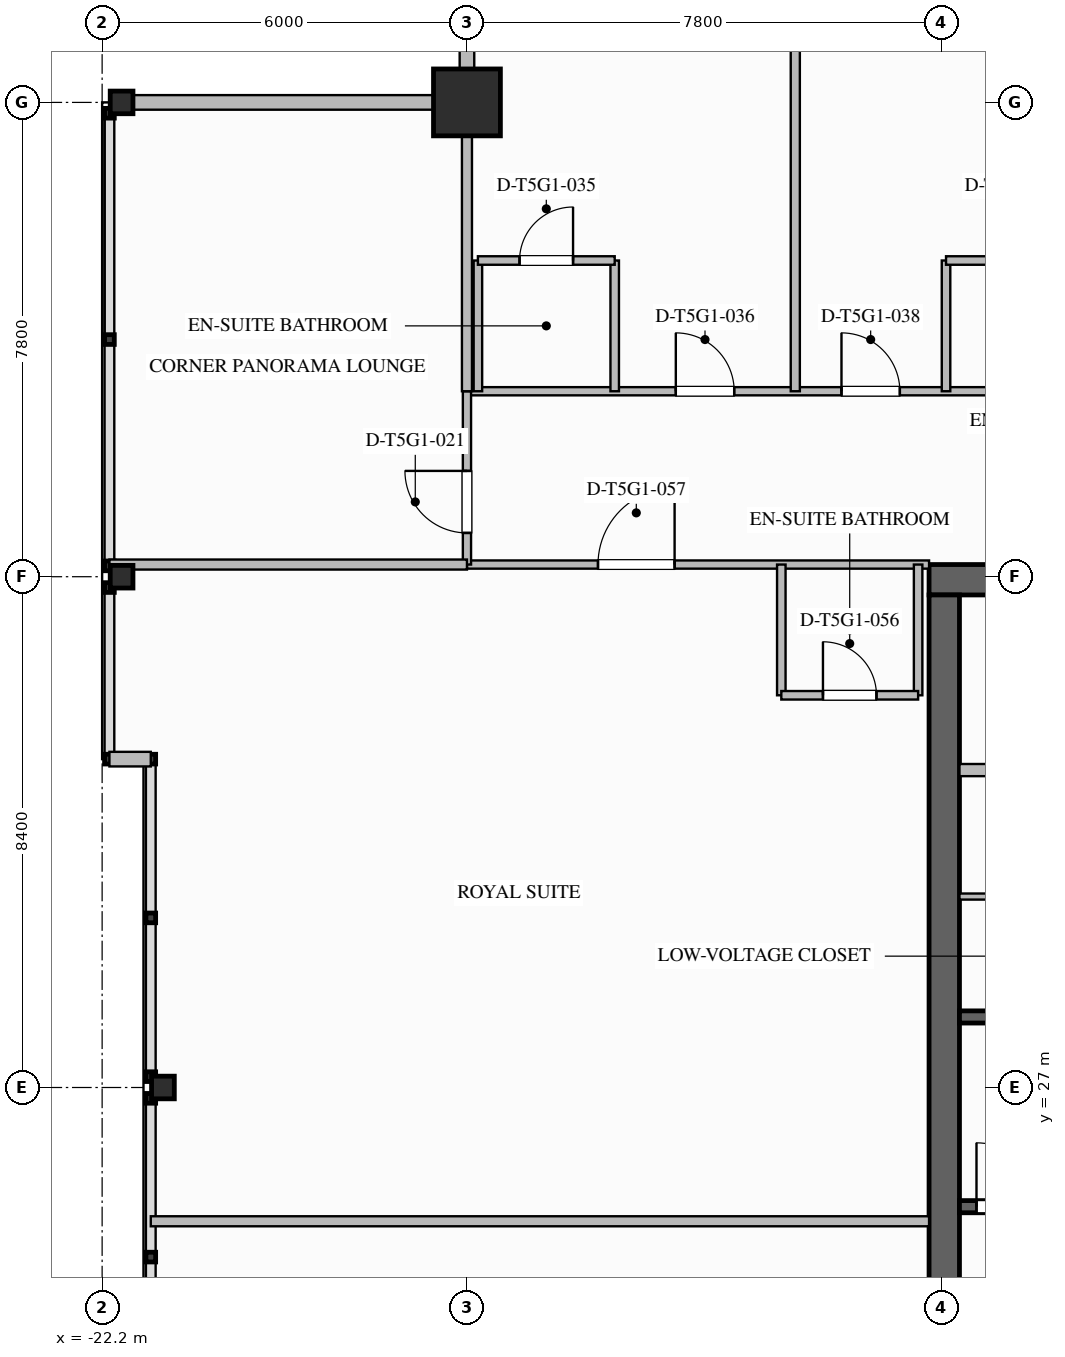
"""IFC4 building model, lengths in metres.
Left out: names, types, materials, properties, quantities, classifications, styles, units other than length and angle.
Written with IfcOpenShell. Run it as: python <this file> out.ifc"""

import sys

from ifc_helpers import new_model, si_unit, direction, frame, frame_2d, origin, origin_2d, place, context, subcontext, project, spatial, rectangle, i_section, extrude, element, fill, save


model = new_model("IFC4")
c1 = context("Model", 3, precision=1e-05, world=origin(), true_north=direction((0.0, 1.0)))
c2 = subcontext(c1, "Body", "Model", "MODEL_VIEW")
j1 = project(units=[si_unit("LENGTHUNIT", "METRE"), si_unit("PLANEANGLEUNIT", "RADIAN")], contexts=[c1])
p1 = place(None, origin())
s1 = spatial("IfcSite", under=j1, at=p1, CompositionType="ELEMENT")
p2 = place(p1, origin())
s2 = spatial("IfcBuilding", under=s1, at=p2, CompositionType="ELEMENT")
p3 = place(p2, frame((0.0, 0.0, 268.65)))
s3 = spatial("IfcBuildingStorey", under=s2, at=p3, CompositionType="ELEMENT", Elevation=268.65)
p4 = place(p3, frame((-8.6, 35.35, 0.0), z_axis=(0.0, 0.0, 1.0), x_axis=(1.0, 0.0, 0.0)))
e1 = element("IfcWall", 1, at=p4, inside=s3, PredefinedType="SHEAR", context=c2, shape_type="SweptSolid", body=[
    extrude(rectangle(XDim=17.2, YDim=0.5, at=frame_2d((8.6, 0.0))), origin(), (0.0, 0.0, 1.0), 3.65),
])
p5 = place(p3, frame((-8.35, 18.9, 0.0), z_axis=(0.0, 0.0, 1.0), x_axis=(0.0, 1.0, 0.0)))
e2 = element("IfcWall", 2, at=p5, inside=s3, PredefinedType="SHEAR", context=c2, shape_type="SweptSolid", body=[
    extrude(rectangle(XDim=16.2, YDim=0.5, at=frame_2d((8.1, 0.0))), origin(), (0.0, 0.0, 1.0), 3.65),
])
p6 = place(p3, frame((-16.2, 43.2, 0.0), z_axis=(0.0, 0.0, 1.0), x_axis=(1.0, 0.0, 0.0)))
e3 = element("IfcColumn", 3, at=p6, inside=s3, PredefinedType="COLUMN", context=c2, shape_type="SweptSolid", body=[
    extrude(rectangle(XDim=1.1, YDim=1.1, at=origin_2d()), origin(), (0.0, 0.0, 1.0), 3.65),
])
for number, where, z_axis, x_axis in (
    (4, (-21.2, 27.0, 0.0), (0.0, 0.0, 1.0), (1.0, 0.0, 0.0)),
    (5, (-21.88, 35.4, 0.0), (0.0, 0.0, 1.0), (1.0, 0.0, 0.0)),
    (6, (-21.88, 43.2, 0.0), (0.0, 0.0, 1.0), (1.0, 0.0, 0.0)),
):
    element("IfcColumn", number, at=place(p3, frame(where, z_axis=z_axis, x_axis=x_axis)), inside=s3, PredefinedType="COLUMN", context=c2, shape_type="SweptSolid", body=[
        extrude(i_section(OverallWidth=0.374, OverallDepth=0.372, WebThickness=0.016, FlangeThickness=0.026, FilletRadius=0.025, at=origin_2d()), origin(), (0.0, 0.0, 1.0), 3.647),
    ])
for number, where, z_axis, x_axis in (
    (7, (-22.08, 43.2, 0.0), (0.0, 0.0, 1.0), (1.0, 0.0, 0.0)),
    (8, (-16.2, 43.2, 0.0), (0.0, 0.0, 1.0), (0.0, 1.0, 0.0)),
):
    element("IfcWall", number, at=place(p3, frame(where, z_axis=z_axis, x_axis=x_axis)), inside=s3, PredefinedType="STANDARD", context=c2, shape_type="SweptSolid", body=[
        extrude(rectangle(XDim=5.88, YDim=0.24, at=frame_2d((2.94, 0.0))), origin(), (0.0, 0.0, 1.0), 2.779),
    ])
p7 = place(p3, frame((-21.4, 32.4, 0.0), z_axis=(0.0, 0.0, 1.0), x_axis=(-1.0, 0.0, 0.0)))
e9 = element("IfcWall", 9, at=p7, inside=s3, PredefinedType="STANDARD", context=c2, shape_type="SweptSolid", body=[
    extrude(rectangle(XDim=0.68, YDim=0.24, at=frame_2d((0.34, 0.0))), origin(), (0.0, 0.0, 1.0), 3.39),
])
p8 = place(p3, frame((-8.1, 25.04, 0.0), z_axis=(0.0, 0.0, 1.0), x_axis=(1.0, 0.0, 0.0)))
e10 = element("IfcWall", 10, at=p8, inside=s3, PredefinedType="SOLIDWALL", context=c2, shape_type="SweptSolid", body=[
    extrude(rectangle(XDim=8.1, YDim=0.2, at=frame_2d((4.05, 0.0))), origin(), (0.0, 0.0, 1.0), 3.39),
])
p9 = place(p8, frame((0.28, 0.0, 0.0)))
e11 = element("IfcOpeningElement", 11, at=p9, cuts=e10, PredefinedType="OPENING", context=c2, shape_type="SweptSolid", body=[
    extrude(rectangle(XDim=1.05, YDim=2.1, at=frame_2d((0.525, 1.05))), frame((0.0, 0.11, 0.0), z_axis=(0.0, -1.0, 0.0), x_axis=(1.0, 0.0, 0.0)), (0.0, 0.0, 1.0), 0.22),
])
p10 = place(p3, frame((-8.1, 28.16, 0.0), z_axis=(0.0, 0.0, 1.0), x_axis=(1.0, 0.0, 0.0)))
e12 = element("IfcWall", 12, at=p10, inside=s3, PredefinedType="SOLIDWALL", context=c2, shape_type="SweptSolid", body=[
    extrude(rectangle(XDim=8.1, YDim=0.2, at=frame_2d((4.05, 0.0))), origin(), (0.0, 0.0, 1.0), 3.39),
])
p11 = place(p3, frame((-8.1, 32.22, 0.0), z_axis=(0.0, 0.0, 1.0), x_axis=(1.0, 0.0, 0.0)))
e13 = element("IfcWall", 13, at=p11, inside=s3, PredefinedType="SOLIDWALL", context=c2, shape_type="SweptSolid", body=[
    extrude(rectangle(XDim=7.1, YDim=0.2, at=frame_2d((3.55, 0.0))), origin(), (0.0, 0.0, 1.0), 3.39),
])
p12 = place(p11, frame((0.95, 0.0, 0.0)))
e14 = element("IfcOpeningElement", 14, at=p12, cuts=e13, PredefinedType="OPENING", context=c2, shape_type="SweptSolid", body=[
    extrude(rectangle(XDim=1.1, YDim=2.2, at=frame_2d((0.55, 1.1))), frame((0.0, 0.11, 0.0), z_axis=(0.0, -1.0, 0.0), x_axis=(1.0, 0.0, 0.0)), (0.0, 0.0, 1.0), 0.22),
])
p13 = place(p11, frame((3.27, 0.0, 0.0)))
e15 = element("IfcOpeningElement", 15, at=p13, cuts=e13, PredefinedType="OPENING", context=c2, shape_type="SweptSolid", body=[
    extrude(rectangle(XDim=1.1, YDim=2.2, at=frame_2d((0.55, 1.1))), frame((0.0, 0.11, 0.0), z_axis=(0.0, -1.0, 0.0), x_axis=(1.0, 0.0, 0.0)), (0.0, 0.0, 1.0), 0.22),
])
p14 = place(p11, frame((5.59, 0.0, 0.0)))
e16 = element("IfcOpeningElement", 16, at=p14, cuts=e13, PredefinedType="OPENING", context=c2, shape_type="SweptSolid", body=[
    extrude(rectangle(XDim=1.1, YDim=2.2, at=frame_2d((0.55, 1.1))), frame((0.0, 0.11, 0.0), z_axis=(0.0, -1.0, 0.0), x_axis=(1.0, 0.0, 0.0)), (0.0, 0.0, 1.0), 0.22),
])
p15 = place(p3, frame((-8.1, 30.14, 0.0), z_axis=(0.0, 0.0, 1.0), x_axis=(1.0, 0.0, 0.0)))
e17 = element("IfcWall", 17, at=p15, inside=s3, PredefinedType="PARTITIONING", context=c2, shape_type="SweptSolid", body=[
    extrude(rectangle(XDim=7.1, YDim=0.1, at=frame_2d((3.55, 0.0))), origin(), (0.0, 0.0, 1.0), 3.39),
])
p16 = place(p15, frame((0.55, 0.0, 0.0)))
e18 = element("IfcOpeningElement", 18, at=p16, cuts=e17, PredefinedType="OPENING", context=c2, shape_type="SweptSolid", body=[
    extrude(rectangle(XDim=0.88, YDim=2.1, at=frame_2d((0.44, 1.05))), frame((0.0, 0.06, 0.0), z_axis=(0.0, -1.0, 0.0), x_axis=(1.0, 0.0, 0.0)), (0.0, 0.0, 1.0), 0.12),
])
p17 = place(p15, frame((3.6, 0.0, 0.0)))
e19 = element("IfcOpeningElement", 19, at=p17, cuts=e17, PredefinedType="OPENING", context=c2, shape_type="SweptSolid", body=[
    extrude(rectangle(XDim=0.92, YDim=2.1, at=frame_2d((0.46, 1.05))), frame((0.0, 0.06, 0.0), z_axis=(0.0, -1.0, 0.0), x_axis=(1.0, 0.0, 0.0)), (0.0, 0.0, 1.0), 0.12),
])
p18 = place(p3, frame((-16.2, 38.45, 0.0), z_axis=(0.0, 0.0, 1.0), x_axis=(1.0, 0.0, 0.0)))
e20 = element("IfcWall", 20, at=p18, inside=s3, PredefinedType="PARTITIONING", context=c2, shape_type="SweptSolid", body=[
    extrude(rectangle(XDim=38.28, YDim=0.135, at=frame_2d((19.14, 0.0))), origin(), (0.0, 0.0, 1.0), 3.39),
])
p19 = place(p18, frame((33.355, 0.0, 0.0)))
e21 = element("IfcOpeningElement", 21, at=p19, cuts=e20, PredefinedType="OPENING", context=c2, shape_type="SweptSolid", body=[
    extrude(rectangle(XDim=1.26, YDim=2.2, at=frame_2d((0.63, 1.1))), frame((0.0, 0.077, 0.0), z_axis=(0.0, -1.0, 0.0), x_axis=(1.0, 0.0, 0.0)), (0.0, 0.0, 1.0), 0.155),
])
p20 = place(p18, frame((3.435, 0.0, 0.0)))
e22 = element("IfcOpeningElement", 22, at=p20, cuts=e20, PredefinedType="OPENING", context=c2, shape_type="SweptSolid", body=[
    extrude(rectangle(XDim=0.96, YDim=2.15, at=frame_2d((0.48, 1.075))), frame((0.0, 0.077, 0.0), z_axis=(0.0, -1.0, 0.0), x_axis=(1.0, 0.0, 0.0)), (0.0, 0.0, 1.0), 0.155),
])
p21 = place(p18, frame((6.16, 0.0, 0.0)))
e23 = element("IfcOpeningElement", 23, at=p21, cuts=e20, PredefinedType="OPENING", context=c2, shape_type="SweptSolid", body=[
    extrude(rectangle(XDim=0.96, YDim=2.15, at=frame_2d((0.48, 1.075))), frame((0.0, 0.077, 0.0), z_axis=(0.0, -1.0, 0.0), x_axis=(1.0, 0.0, 0.0)), (0.0, 0.0, 1.0), 0.155),
])
p22 = place(p18, frame((13.99, 0.0, 0.0)))
e24 = element("IfcOpeningElement", 24, at=p22, cuts=e20, PredefinedType="OPENING", context=c2, shape_type="SweptSolid", body=[
    extrude(rectangle(XDim=0.96, YDim=2.15, at=frame_2d((0.48, 1.075))), frame((0.0, 0.077, 0.0), z_axis=(0.0, -1.0, 0.0), x_axis=(1.0, 0.0, 0.0)), (0.0, 0.0, 1.0), 0.155),
])
p23 = place(p18, frame((17.45, 0.0, 0.0)))
e25 = element("IfcOpeningElement", 25, at=p23, cuts=e20, PredefinedType="OPENING", context=c2, shape_type="SweptSolid", body=[
    extrude(rectangle(XDim=0.96, YDim=2.15, at=frame_2d((0.48, 1.075))), frame((0.0, 0.077, 0.0), z_axis=(0.0, -1.0, 0.0), x_axis=(1.0, 0.0, 0.0)), (0.0, 0.0, 1.0), 0.155),
])
p24 = place(p18, frame((25.281, 0.0, 0.0)))
e26 = element("IfcOpeningElement", 26, at=p24, cuts=e20, PredefinedType="OPENING", context=c2, shape_type="SweptSolid", body=[
    extrude(rectangle(XDim=0.96, YDim=2.15, at=frame_2d((0.48, 1.075))), frame((0.0, 0.077, 0.0), z_axis=(0.0, -1.0, 0.0), x_axis=(1.0, 0.0, 0.0)), (0.0, 0.0, 1.0), 0.155),
])
p25 = place(p18, frame((28.005, 0.0, 0.0)))
e27 = element("IfcOpeningElement", 27, at=p25, cuts=e20, PredefinedType="OPENING", context=c2, shape_type="SweptSolid", body=[
    extrude(rectangle(XDim=0.96, YDim=2.15, at=frame_2d((0.48, 1.075))), frame((0.0, 0.077, 0.0), z_axis=(0.0, -1.0, 0.0), x_axis=(1.0, 0.0, 0.0)), (0.0, 0.0, 1.0), 0.155),
])
p26 = place(p3, frame((-16.2, 35.6, 0.0), z_axis=(0.0, 0.0, 1.0), x_axis=(1.0, 0.0, 0.0)))
e28 = element("IfcWall", 28, at=p26, inside=s3, PredefinedType="PARTITIONING", context=c2, shape_type="SweptSolid", body=[
    extrude(rectangle(XDim=7.6, YDim=0.135, at=frame_2d((3.8, 0.0))), origin(), (0.0, 0.0, 1.0), 2.768),
])
p27 = place(p26, frame((2.155, 0.0, 0.0)))
e29 = element("IfcOpeningElement", 29, at=p27, cuts=e28, PredefinedType="OPENING", context=c2, shape_type="SweptSolid", body=[
    extrude(rectangle(XDim=1.26, YDim=2.2, at=frame_2d((0.63, 1.1))), frame((0.0, 0.077, 0.0), z_axis=(0.0, -1.0, 0.0), x_axis=(1.0, 0.0, 0.0)), (0.0, 0.0, 1.0), 0.155),
])
p28 = place(p3, frame((-16.2, 35.6, 0.0), z_axis=(0.0, 0.0, 1.0), x_axis=(0.0, 1.0, 0.0)))
e30 = element("IfcWall", 30, at=p28, inside=s3, PredefinedType="PARTITIONING", context=c2, shape_type="SweptSolid", body=[
    extrude(rectangle(XDim=2.85, YDim=0.135, at=frame_2d((1.425, 0.0))), origin(), (0.0, 0.0, 1.0), 2.764),
])
p29 = place(p28, frame((0.52, 0.0, 0.0)))
e31 = element("IfcOpeningElement", 31, at=p29, cuts=e30, PredefinedType="OPENING", context=c2, shape_type="SweptSolid", body=[
    extrude(rectangle(XDim=1.02, YDim=2.15, at=frame_2d((0.51, 1.075))), frame((0.0, 0.077, 0.0), z_axis=(0.0, -1.0, 0.0), x_axis=(1.0, 0.0, 0.0)), (0.0, 0.0, 1.0), 0.155),
])
p30 = place(p3, frame((-16.2, 38.45, 0.0), z_axis=(0.0, 0.0, 1.0), x_axis=(0.0, 1.0, 0.0)))
e32 = element("IfcWall", 32, at=p30, inside=s3, PredefinedType="PARTITIONING", context=c2, shape_type="SweptSolid", body=[
    extrude(rectangle(XDim=4.63, YDim=0.165, at=frame_2d((2.315, 0.0))), origin(), (0.0, 0.0, 1.0), 2.764),
])
p31 = place(p3, frame((-22.08, 35.6, 0.0), z_axis=(0.0, 0.0, 1.0), x_axis=(1.0, 0.0, 0.0)))
e33 = element("IfcWall", 33, at=p31, inside=s3, PredefinedType="PARTITIONING", context=c2, shape_type="SweptSolid", body=[
    extrude(rectangle(XDim=5.88, YDim=0.165, at=frame_2d((2.94, 0.0))), origin(), (0.0, 0.0, 1.0), 2.764),
])
p32 = place(p3, frame((-16.02, 38.45, 0.0), z_axis=(0.0, 0.0, 1.0), x_axis=(0.0, 1.0, 0.0)))
e34 = element("IfcWall", 34, at=p32, inside=s3, PredefinedType="PLUMBINGWALL", context=c2, shape_type="SweptSolid", body=[
    extrude(rectangle(XDim=2.15, YDim=0.14, at=frame_2d((1.075, 0.0))), origin(), (0.0, 0.0, 1.0), 2.764),
])
p33 = place(p3, frame((-13.77, 38.45, 0.0), z_axis=(0.0, 0.0, 1.0), x_axis=(0.0, 1.0, 0.0)))
e35 = element("IfcWall", 35, at=p33, inside=s3, PredefinedType="PLUMBINGWALL", context=c2, shape_type="SweptSolid", body=[
    extrude(rectangle(XDim=2.15, YDim=0.14, at=frame_2d((1.075, 0.0))), origin(), (0.0, 0.0, 1.0), 3.39),
])
p34 = place(p3, frame((-16.02, 40.6, 0.0), z_axis=(0.0, 0.0, 1.0), x_axis=(1.0, 0.0, 0.0)))
e36 = element("IfcWall", 36, at=p34, inside=s3, PredefinedType="PLUMBINGWALL", context=c2, shape_type="SweptSolid", body=[
    extrude(rectangle(XDim=2.25, YDim=0.14, at=frame_2d((1.125, 0.0))), origin(), (0.0, 0.0, 1.0), 3.39),
])
p35 = place(p34, frame((0.685, 0.0, 0.0)))
e37 = element("IfcOpeningElement", 37, at=p35, cuts=e36, PredefinedType="OPENING", context=c2, shape_type="SweptSolid", body=[
    extrude(rectangle(XDim=0.88, YDim=2.1, at=frame_2d((0.44, 1.05))), frame((0.0, 0.08, 0.0), z_axis=(0.0, -1.0, 0.0), x_axis=(1.0, 0.0, 0.0)), (0.0, 0.0, 1.0), 0.16),
])
p36 = place(p3, frame((-10.8, 38.45, 0.0), z_axis=(0.0, 0.0, 1.0), x_axis=(0.0, 1.0, 0.0)))
e38 = element("IfcWall", 38, at=p36, inside=s3, PredefinedType="PARTITIONING", context=c2, shape_type="SweptSolid", body=[
    extrude(rectangle(XDim=10.63, YDim=0.15, at=frame_2d((5.315, 0.0))), origin(), (0.0, 0.0, 1.0), 3.39),
])
p37 = place(p3, frame((-8.321, 38.45, 0.0), z_axis=(0.0, 0.0, 1.0), x_axis=(0.0, 1.0, 0.0)))
e39 = element("IfcWall", 39, at=p37, inside=s3, PredefinedType="PLUMBINGWALL", context=c2, shape_type="SweptSolid", body=[
    extrude(rectangle(XDim=2.15, YDim=0.14, at=frame_2d((1.075, 0.0))), origin(), (0.0, 0.0, 1.0), 2.768),
])
p38 = place(p3, frame((-8.321, 40.6, 0.0), z_axis=(0.0, 0.0, 1.0), x_axis=(1.0, 0.0, 0.0)))
e40 = element("IfcWall", 40, at=p38, inside=s3, PredefinedType="PLUMBINGWALL", context=c2, shape_type="SweptSolid", body=[
    extrude(rectangle(XDim=2.25, YDim=0.14, at=frame_2d((1.125, 0.0))), origin(), (0.0, 0.0, 1.0), 3.39),
])
p39 = place(p38, frame((0.685, 0.0, 0.0)))
e41 = element("IfcOpeningElement", 41, at=p39, cuts=e40, PredefinedType="OPENING", context=c2, shape_type="SweptSolid", body=[
    extrude(rectangle(XDim=0.88, YDim=2.1, at=frame_2d((0.44, 1.05))), frame((0.0, 0.08, 0.0), z_axis=(0.0, -1.0, 0.0), x_axis=(1.0, 0.0, 0.0)), (0.0, 0.0, 1.0), 0.16),
])
p40 = place(p3, frame((-21.4, 24.8, 0.0), z_axis=(0.0, 0.0, 1.0), x_axis=(1.0, 0.0, 0.0)))
e42 = element("IfcWall", 42, at=p40, inside=s3, PredefinedType="PARTITIONING", context=c2, shape_type="SweptSolid", body=[
    extrude(rectangle(XDim=12.8, YDim=0.165, at=frame_2d((6.4, 0.0))), origin(), (0.0, 0.0, 1.0), 3.39),
])
for number, where, z_axis, x_axis in (
    (43, (-11.03, 35.6, 0.0), (0.0, 0.0, 1.0), (0.0, -1.0, 0.0)),
    (44, (-8.78, 35.6, 0.0), (0.0, 0.0, 1.0), (0.0, -1.0, 0.0)),
):
    element("IfcWall", number, at=place(p3, frame(where, z_axis=z_axis, x_axis=x_axis)), inside=s3, PredefinedType="PLUMBINGWALL", context=c2, shape_type="SweptSolid", body=[
        extrude(rectangle(XDim=2.15, YDim=0.14, at=frame_2d((1.075, 0.0))), origin(), (0.0, 0.0, 1.0), 3.39),
    ])
p41 = place(p3, frame((-11.03, 33.45, 0.0), z_axis=(0.0, 0.0, 1.0), x_axis=(1.0, 0.0, 0.0)))
e45 = element("IfcWall", 45, at=p41, inside=s3, PredefinedType="PLUMBINGWALL", context=c2, shape_type="SweptSolid", body=[
    extrude(rectangle(XDim=2.25, YDim=0.14, at=frame_2d((1.125, 0.0))), origin(), (0.0, 0.0, 1.0), 3.39),
])
p42 = place(p41, frame((0.685, 0.0, 0.0)))
e46 = element("IfcOpeningElement", 46, at=p42, cuts=e45, PredefinedType="OPENING", context=c2, shape_type="SweptSolid", body=[
    extrude(rectangle(XDim=0.88, YDim=2.1, at=frame_2d((0.44, 1.05))), frame((0.0, 0.08, 0.0), z_axis=(0.0, -1.0, 0.0), x_axis=(1.0, 0.0, 0.0)), (0.0, 0.0, 1.0), 0.16),
])
p43 = place(p9, origin())
e47 = element("IfcDoor", 47, at=p43, inside=s3, OperationType="SINGLE_SWING_LEFT", PredefinedType="DOOR", context=c2, shape_type="SweptSolid", body=[
    extrude(rectangle(XDim=1.05, YDim=2.1, at=frame_2d((0.525, 1.05))), frame((0.0, 0.025, 0.0), z_axis=(0.0, -1.0, 0.0), x_axis=(1.0, 0.0, 0.0)), (0.0, 0.0, 1.0), 0.05),
])
fill(e11, e47)
p44 = place(p29, origin())
e48 = element("IfcDoor", 48, at=p44, inside=s3, OperationType="SINGLE_SWING_RIGHT", PredefinedType="DOOR", context=c2, shape_type="SweptSolid", body=[
    extrude(rectangle(XDim=1.02, YDim=2.15, at=frame_2d((0.51, 1.075))), frame((0.0, 0.025, 0.0), z_axis=(0.0, -1.0, 0.0), x_axis=(1.0, 0.0, 0.0)), (0.0, 0.0, 1.0), 0.05),
])
fill(e31, e48)
p45 = place(p35, origin())
e49 = element("IfcDoor", 49, at=p45, inside=s3, OperationType="SINGLE_SWING_RIGHT", PredefinedType="DOOR", context=c2, shape_type="SweptSolid", body=[
    extrude(rectangle(XDim=0.88, YDim=2.1, at=frame_2d((0.44, 1.05))), frame((0.0, 0.025, 0.0), z_axis=(0.0, -1.0, 0.0), x_axis=(1.0, 0.0, 0.0)), (0.0, 0.0, 1.0), 0.05),
])
fill(e37, e49)
p46 = place(p20, origin())
e50 = element("IfcDoor", 50, at=p46, inside=s3, OperationType="SINGLE_SWING_LEFT", PredefinedType="DOOR", context=c2, shape_type="SweptSolid", body=[
    extrude(rectangle(XDim=0.96, YDim=2.15, at=frame_2d((0.48, 1.075))), frame((0.0, 0.025, 0.0), z_axis=(0.0, -1.0, 0.0), x_axis=(1.0, 0.0, 0.0)), (0.0, 0.0, 1.0), 0.05),
])
fill(e22, e50)
p47 = place(p21, origin())
e51 = element("IfcDoor", 51, at=p47, inside=s3, OperationType="SINGLE_SWING_LEFT", PredefinedType="DOOR", context=c2, shape_type="SweptSolid", body=[
    extrude(rectangle(XDim=0.96, YDim=2.15, at=frame_2d((0.48, 1.075))), frame((0.0, 0.025, 0.0), z_axis=(0.0, -1.0, 0.0), x_axis=(1.0, 0.0, 0.0)), (0.0, 0.0, 1.0), 0.05),
])
fill(e23, e51)
p48 = place(p42, origin())
e52 = element("IfcDoor", 52, at=p48, inside=s3, OperationType="SINGLE_SWING_LEFT", PredefinedType="DOOR", context=c2, shape_type="SweptSolid", body=[
    extrude(rectangle(XDim=0.88, YDim=2.1, at=frame_2d((0.44, 1.05))), frame((0.0, 0.025, 0.0), z_axis=(0.0, -1.0, 0.0), x_axis=(1.0, 0.0, 0.0)), (0.0, 0.0, 1.0), 0.05),
])
fill(e46, e52)
p49 = place(p27, origin())
e53 = element("IfcDoor", 53, at=p49, inside=s3, OperationType="SINGLE_SWING_RIGHT", PredefinedType="DOOR", context=c2, shape_type="SweptSolid", body=[
    extrude(rectangle(XDim=1.26, YDim=2.2, at=frame_2d((0.63, 1.1))), frame((0.0, 0.025, 0.0), z_axis=(0.0, -1.0, 0.0), x_axis=(1.0, 0.0, 0.0)), (0.0, 0.0, 1.0), 0.05),
])
fill(e29, e53)
save(model, sys.argv[1])
